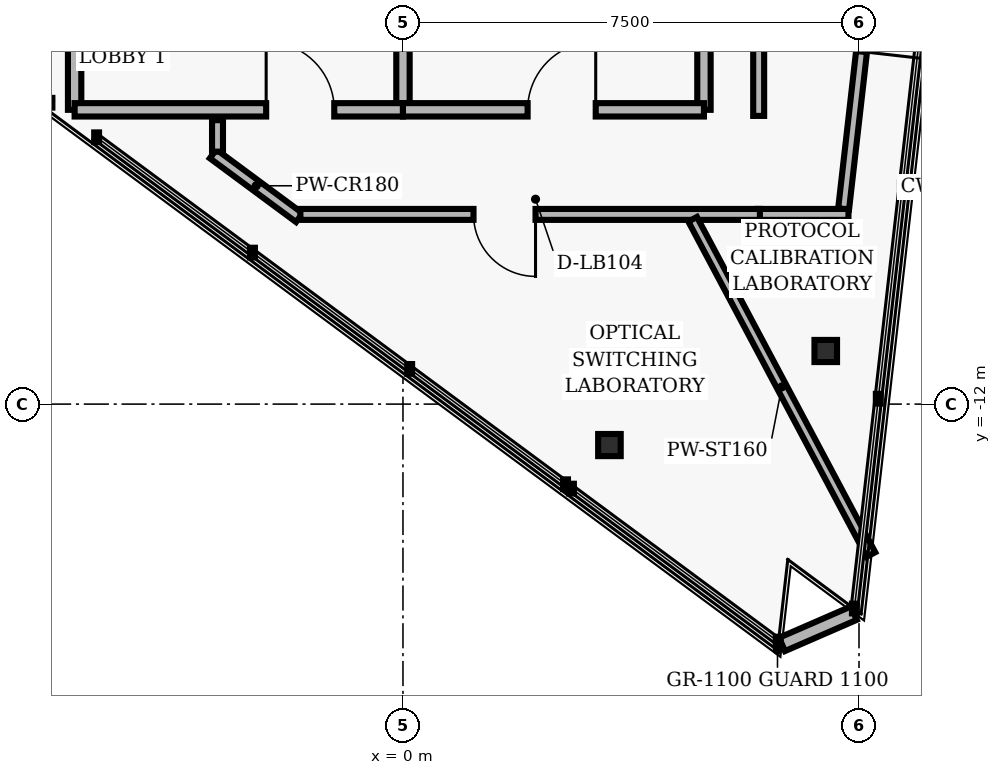
"""IFC4 building model, lengths in metres.
Left out: names, types, materials, properties, quantities, classifications, styles, units other than length and angle.
Written with IfcOpenShell. Run it as: python <this file> out.ifc"""

import sys

from ifc_helpers import new_model, si_unit, direction, frame, frame_2d, origin, origin_2d, place, context, subcontext, project, spatial, rectangle, i_section, extrude, element, fill, save


model = new_model("IFC4")
c1 = context("Model", 3, precision=1e-05, world=origin(), true_north=direction((0.0, 1.0)))
c2 = subcontext(c1, "Body", "Model", "MODEL_VIEW")
j1 = project(units=[si_unit("LENGTHUNIT", "METRE"), si_unit("PLANEANGLEUNIT", "RADIAN")], contexts=[c1])
p1 = place(None, origin())
s1 = spatial("IfcSite", under=j1, at=p1, CompositionType="ELEMENT")
p2 = place(p1, origin())
s2 = spatial("IfcBuilding", under=s1, at=p2, CompositionType="ELEMENT")
p3 = place(p2, frame((0.0, 0.0, 252.0)))
s3 = spatial("IfcBuildingStorey", under=s2, at=p3, CompositionType="ELEMENT", Elevation=252.0)
for number, where, z_axis, x_axis in (
    (1, (6.953, -11.127, 0.0), (0.0, 0.0, 1.0), (1.0, 0.0, 0.0)),
    (2, (3.396, -12.674, 0.0), (0.0, 0.0, 1.0), (1.0, 0.0, 0.0)),
):
    element("IfcColumn", number, at=place(p3, frame(where, z_axis=z_axis, x_axis=x_axis)), inside=s3, PredefinedType="COLUMN", context=c2, shape_type="SweptSolid", body=[
        extrude(i_section(OverallWidth=0.371, OverallDepth=0.364, WebThickness=0.013, FlangeThickness=0.022, FilletRadius=0.015, at=origin_2d()), origin(), (0.0, 0.0, 1.0), 2.88),
    ])
p4 = place(p3, frame((6.234, -15.952, 0.0), z_axis=(0.0, 0.0, 1.0), x_axis=(0.917064030228, 0.398739970986, 0.0)))
e3 = element("IfcWall", 3, at=p4, inside=s3, PredefinedType="PARAPET", context=c2, shape_type="SweptSolid", body=[
    extrude(rectangle(XDim=1.288, YDim=0.24, at=frame_2d((0.644, 0.0))), origin(), (0.0, 0.0, 1.0), 2.168),
])
for number, where, z_axis, x_axis in (
    (4, (-5.4, -7.16, 0.0), (0.0, 0.0, 1.0), (0.0, 1.0, 0.0)),
    (5, (4.95, -7.16, 0.0), (0.0, 0.0, 1.0), (0.0, 1.0, 0.0)),
):
    element("IfcWall", number, at=place(p3, frame(where, z_axis=z_axis, x_axis=x_axis)), inside=s3, PredefinedType="PARTITIONING", context=c2, shape_type="SweptSolid", body=[
        extrude(rectangle(XDim=2.71, YDim=0.22, at=frame_2d((1.355, 0.0))), origin(), (0.0, 0.0, 1.0), 2.623),
    ])
p5 = place(p3, frame((0.0, -7.16, 0.0), z_axis=(0.0, 0.0, 1.0), x_axis=(0.0, 1.0, 0.0)))
e6 = element("IfcWall", 6, at=p5, inside=s3, PredefinedType="PARTITIONING", context=c2, shape_type="SweptSolid", body=[
    extrude(rectangle(XDim=2.81, YDim=0.22, at=frame_2d((1.405, 0.0))), origin(), (0.0, 0.0, 1.0), 2.623),
])
p6 = place(p3, frame((-5.4, -7.16, 0.0), z_axis=(0.0, 0.0, 1.0), x_axis=(1.0, 0.0, 0.0)))
e7 = element("IfcWall", 7, at=p6, inside=s3, PredefinedType="PARTITIONING", context=c2, shape_type="SweptSolid", body=[
    extrude(rectangle(XDim=5.4, YDim=0.22, at=frame_2d((2.7, 0.0))), origin(), (0.0, 0.0, 1.0), 2.623),
])
p7 = place(p6, frame((3.15, 0.0, 0.0)))
e8 = element("IfcOpeningElement", 8, at=p7, cuts=e7, PredefinedType="OPENING", context=c2, shape_type="SweptSolid", body=[
    extrude(rectangle(XDim=1.12, YDim=2.02, at=frame_2d((0.56, 1.01))), frame((0.0, 0.12, 0.0), z_axis=(0.0, -1.0, 0.0), x_axis=(1.0, 0.0, 0.0)), (0.0, 0.0, 1.0), 0.24),
])
p8 = place(p3, frame((0.0, -7.16, 0.0), z_axis=(0.0, 0.0, 1.0), x_axis=(1.0, 0.0, 0.0)))
e9 = element("IfcWall", 9, at=p8, inside=s3, PredefinedType="PARTITIONING", context=c2, shape_type="SweptSolid", body=[
    extrude(rectangle(XDim=4.95, YDim=0.22, at=frame_2d((2.475, 0.0))), origin(), (0.0, 0.0, 1.0), 2.623),
])
p9 = place(p8, frame((2.05, 0.0, 0.0)))
e10 = element("IfcOpeningElement", 10, at=p9, cuts=e9, PredefinedType="OPENING", context=c2, shape_type="SweptSolid", body=[
    extrude(rectangle(XDim=1.12, YDim=2.02, at=frame_2d((0.56, 1.01))), frame((0.0, 0.12, 0.0), z_axis=(0.0, -1.0, 0.0), x_axis=(1.0, 0.0, 0.0)), (0.0, 0.0, 1.0), 0.24),
])
p10 = place(p3, frame((-1.705, -8.934, 0.0), z_axis=(0.0, 0.0, 1.0), x_axis=(-0.803804826616, 0.594893100236, 0.0)))
e11 = element("IfcWall", 11, at=p10, inside=s3, PredefinedType="PARTITIONING", context=c2, shape_type="SweptSolid", body=[
    extrude(rectangle(XDim=1.763, YDim=0.18, at=frame_2d((0.882, 0.0))), origin(), (0.0, 0.0, 1.0), 2.203),
])
p11 = place(p3, frame((-3.05, -7.848, 0.0), z_axis=(0.0, 0.0, 1.0), x_axis=(0.0, 1.0, 0.0)))
e12 = element("IfcWall", 12, at=p11, inside=s3, PredefinedType="PARTITIONING", context=c2, shape_type="SweptSolid", body=[
    extrude(rectangle(XDim=0.518, YDim=0.18, at=frame_2d((0.259, 0.0))), origin(), (0.0, 0.0, 1.0), 2.623),
])
p12 = place(p3, frame((5.85, -7.26, 0.0), z_axis=(0.0, 0.0, 1.0), x_axis=(0.0, 1.0, 0.0)))
e13 = element("IfcWall", 13, at=p12, inside=s3, PredefinedType="PARTITIONING", context=c2, shape_type="SweptSolid", body=[
    extrude(rectangle(XDim=2.61, YDim=0.18, at=frame_2d((1.305, 0.0))), origin(), (0.0, 0.0, 1.0), 2.153),
])
p13 = place(p3, frame((7.952, -2.599, 0.0), z_axis=(0.0, 0.0, 1.0), x_axis=(-0.113221740547, -0.993569744642, 0.0)))
e14 = element("IfcWall", 14, at=p13, inside=s3, PredefinedType="PARTITIONING", context=c2, shape_type="SweptSolid", body=[
    extrude(rectangle(XDim=6.232, YDim=0.18, at=frame_2d((3.116, 0.0))), origin(), (0.0, 0.0, 1.0), 2.203),
])
p14 = place(p13, frame((2.606, 0.0, 0.0)))
e15 = element("IfcOpeningElement", 15, at=p14, cuts=e14, PredefinedType="OPENING", context=c2, shape_type="SweptSolid", body=[
    extrude(rectangle(XDim=1.02, YDim=2.02, at=frame_2d((0.51, 1.01))), frame((0.0, 0.1, 0.0), z_axis=(0.0, -1.0, 0.0), x_axis=(1.0, 0.0, 0.0)), (0.0, 0.0, 1.0), 0.2),
])
p15 = place(p3, frame((7.327, -8.88, 0.0), z_axis=(0.0, 0.0, 1.0), x_axis=(-1.0, 0.0, 0.0)))
e16 = element("IfcWall", 16, at=p15, inside=s3, PredefinedType="PARTITIONING", context=c2, shape_type="SweptSolid", body=[
    extrude(rectangle(XDim=1.497, YDim=0.18, at=frame_2d((0.748, 0.0))), origin(), (0.0, 0.0, 1.0), 2.623),
])
p16 = place(p3, frame((5.87, -8.88, 0.0), z_axis=(0.0, 0.0, 1.0), x_axis=(-1.0, 0.0, 0.0)))
e17 = element("IfcWall", 17, at=p16, inside=s3, PredefinedType="PARTITIONING", context=c2, shape_type="SweptSolid", body=[
    extrude(rectangle(XDim=7.557, YDim=0.18, at=frame_2d((3.779, 0.0))), origin(), (0.0, 0.0, 1.0), 2.623),
])
p17 = place(p16, frame((3.69, 0.0, 0.0)))
e18 = element("IfcOpeningElement", 18, at=p17, cuts=e17, PredefinedType="OPENING", context=c2, shape_type="SweptSolid", body=[
    extrude(rectangle(XDim=1.02, YDim=2.02, at=frame_2d((0.51, 1.01))), frame((0.0, 0.1, 0.0), z_axis=(0.0, -1.0, 0.0), x_axis=(1.0, 0.0, 0.0)), (0.0, 0.0, 1.0), 0.2),
])
p18 = place(p3, frame((4.764, -8.96, 0.0), z_axis=(0.0, 0.0, 1.0), x_axis=(0.469463863752, -0.882951686465, 0.0)))
e19 = element("IfcWall", 19, at=p18, inside=s3, PredefinedType="PARTITIONING", context=c2, shape_type="SweptSolid", body=[
    extrude(rectangle(XDim=6.246, YDim=0.16, at=frame_2d((3.123, 0.0))), origin(), (0.0, 0.0, 1.0), 2.623),
])
p19 = place(p7, origin())
e20 = element("IfcDoor", 20, at=p19, inside=s3, OperationType="SINGLE_SWING_LEFT", PredefinedType="DOOR", context=c2, shape_type="SweptSolid", body=[
    extrude(rectangle(XDim=1.12, YDim=2.02, at=frame_2d((0.56, 1.01))), frame((0.0, 0.025, 0.0), z_axis=(0.0, -1.0, 0.0), x_axis=(1.0, 0.0, 0.0)), (0.0, 0.0, 1.0), 0.05),
])
fill(e8, e20)
p20 = place(p9, origin())
e21 = element("IfcDoor", 21, at=p20, inside=s3, OperationType="SINGLE_SWING_RIGHT", PredefinedType="DOOR", context=c2, shape_type="SweptSolid", body=[
    extrude(rectangle(XDim=1.12, YDim=2.02, at=frame_2d((0.56, 1.01))), frame((0.0, 0.025, 0.0), z_axis=(0.0, -1.0, 0.0), x_axis=(1.0, 0.0, 0.0)), (0.0, 0.0, 1.0), 0.05),
])
fill(e10, e21)
p21 = place(p17, origin())
e22 = element("IfcDoor", 22, at=p21, inside=s3, OperationType="SINGLE_SWING_LEFT", PredefinedType="DOOR", context=c2, shape_type="SweptSolid", body=[
    extrude(rectangle(XDim=1.02, YDim=2.02, at=frame_2d((0.51, 1.01))), frame((0.0, 0.025, 0.0), z_axis=(0.0, -1.0, 0.0), x_axis=(1.0, 0.0, 0.0)), (0.0, 0.0, 1.0), 0.05),
])
fill(e18, e22)
save(model, sys.argv[1])
